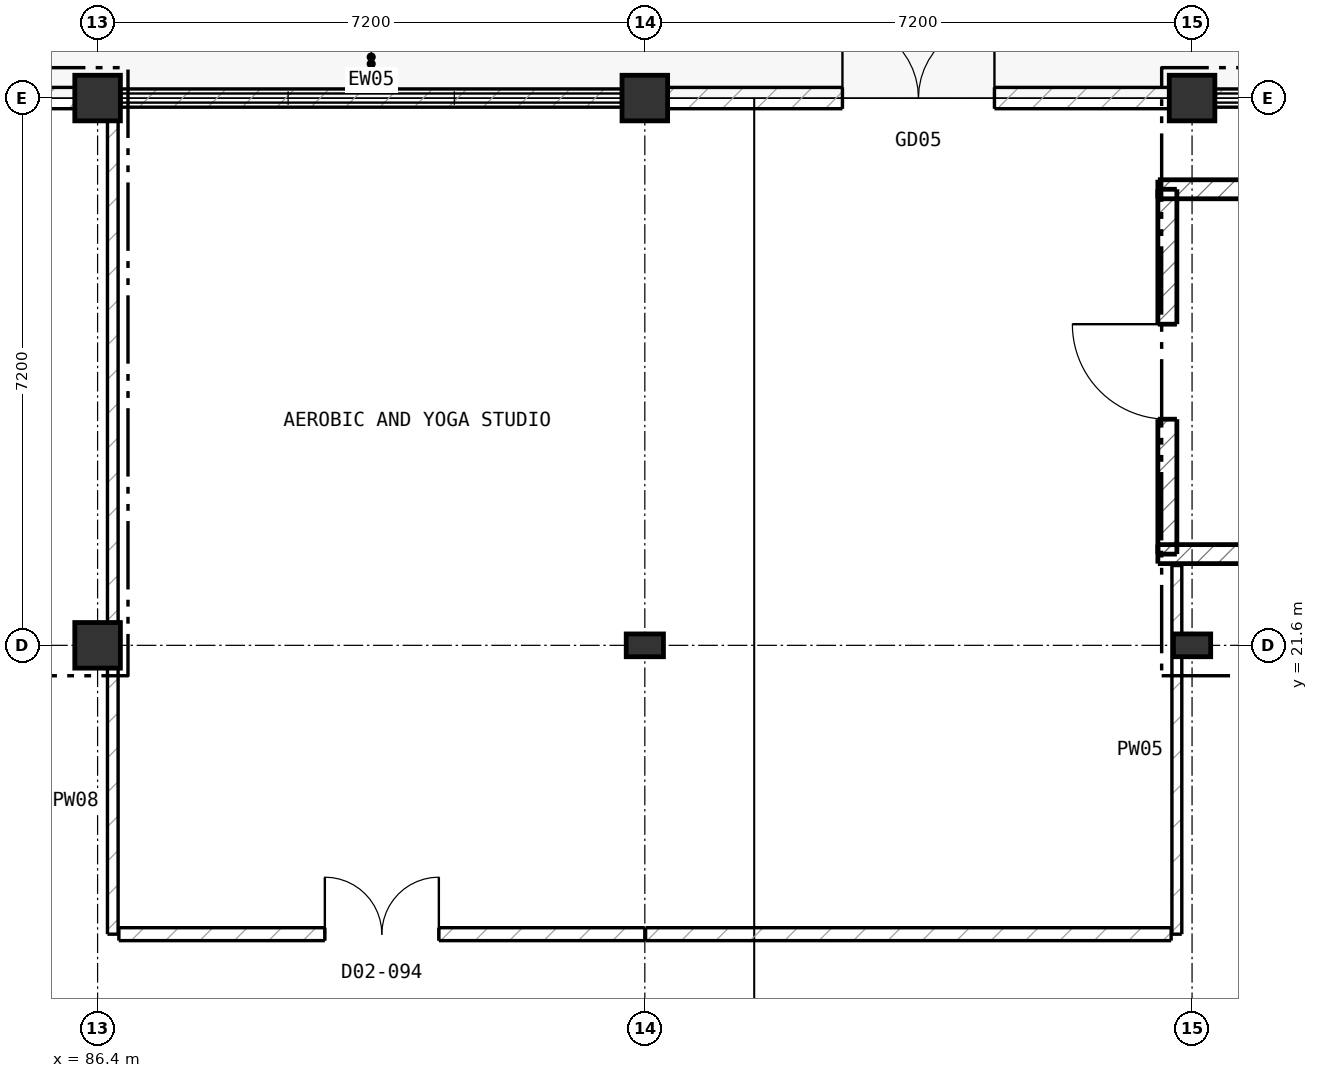
"""IFC4 building model, lengths in metres.
Left out: names, types, materials, properties, quantities, classifications, styles, units other than length and angle.
Written with IfcOpenShell. Run it as: python <this file> out.ifc"""

import sys

from ifc_helpers import new_model, si_unit, direction, frame, frame_2d, origin, origin_2d, place, context, subcontext, project, spatial, rectangle, i_section, extrude, element, fill, save


model = new_model("IFC4")
c1 = context("Model", 3, precision=1e-05, world=origin(), true_north=direction((0.0, 1.0)))
c2 = subcontext(c1, "Body", "Model", "MODEL_VIEW")
j1 = project(units=[si_unit("LENGTHUNIT", "METRE"), si_unit("PLANEANGLEUNIT", "RADIAN")], contexts=[c1])
p1 = place(None, origin())
s1 = spatial("IfcSite", under=j1, at=p1, CompositionType="ELEMENT")
p2 = place(p1, origin())
s2 = spatial("IfcBuilding", under=s1, at=p2, CompositionType="ELEMENT")
p3 = place(p2, frame((0.0, 0.0, 11.2)))
s3 = spatial("IfcBuildingStorey", under=s2, at=p3, CompositionType="ELEMENT", Elevation=11.2)
for number, where, z_axis, x_axis in (
    (1, (86.4, 21.6, 0.0), (0.0, 0.0, 1.0), (1.0, 0.0, 0.0)),
    (2, (86.4, 28.8, 0.0), (0.0, 0.0, 1.0), (1.0, 0.0, 0.0)),
):
    element("IfcColumn", number, at=place(p3, frame(where, z_axis=z_axis, x_axis=x_axis)), inside=s3, PredefinedType="COLUMN", context=c2, shape_type="SweptSolid", body=[
        extrude(rectangle(XDim=0.6, YDim=0.6, at=origin_2d()), origin(), (0.0, 0.0, 1.0), 4.8),
    ])
p4 = place(p3, frame((93.6, 21.6, 0.0), z_axis=(0.0, 0.0, 1.0), x_axis=(1.0, 0.0, 0.0)))
e3 = element("IfcColumn", 3, at=p4, inside=s3, PredefinedType="COLUMN", context=c2, shape_type="SweptSolid", body=[
    extrude(i_section(OverallWidth=0.3, OverallDepth=0.49, WebThickness=0.012, FlangeThickness=0.023, at=origin_2d()), origin(), (0.0, 0.0, 1.0), 4.8),
])
p5 = place(p3, frame((93.6, 28.8, 0.0), z_axis=(0.0, 0.0, 1.0), x_axis=(1.0, 0.0, 0.0)))
e4 = element("IfcColumn", 4, at=p5, inside=s3, PredefinedType="COLUMN", context=c2, shape_type="SweptSolid", body=[
    extrude(rectangle(XDim=0.6, YDim=0.6, at=origin_2d()), origin(), (0.0, 0.0, 1.0), 4.8),
])
p6 = place(p3, frame((100.8, 21.6, 0.0), z_axis=(0.0, 0.0, 1.0), x_axis=(1.0, 0.0, 0.0)))
e5 = element("IfcColumn", 5, at=p6, inside=s3, PredefinedType="COLUMN", context=c2, shape_type="SweptSolid", body=[
    extrude(i_section(OverallWidth=0.3, OverallDepth=0.49, WebThickness=0.012, FlangeThickness=0.023, at=origin_2d()), origin(), (0.0, 0.0, 1.0), 4.8),
])
p7 = place(p3, frame((100.8, 28.8, 0.0), z_axis=(0.0, 0.0, 1.0), x_axis=(1.0, 0.0, 0.0)))
e6 = element("IfcColumn", 6, at=p7, inside=s3, PredefinedType="COLUMN", context=c2, shape_type="SweptSolid", body=[
    extrude(rectangle(XDim=0.6, YDim=0.6, at=origin_2d()), origin(), (0.0, 0.0, 1.0), 4.8),
])
p8 = place(p3, frame((79.485, 28.8, 0.0), z_axis=(0.0, 0.0, 1.0), x_axis=(1.0, 0.0, 0.0)))
e7 = element("IfcWall", 7, at=p8, inside=s3, PredefinedType="SOLIDWALL", context=c2, shape_type="SweptSolid", body=[
    extrude(rectangle(XDim=6.63, YDim=0.28, at=frame_2d((3.315, 0.0))), origin(), (0.0, 0.0, 1.0), 4.185),
])
p9 = place(p8, frame((2.315, 0.0, 0.0)))
e8 = element("IfcOpeningElement", 8, at=p9, cuts=e7, PredefinedType="OPENING", context=c2, shape_type="SweptSolid", body=[
    extrude(rectangle(XDim=2.0, YDim=2.4, at=frame_2d((1.0, 1.2))), frame((0.0, 0.15, 0.0), z_axis=(0.0, -1.0, 0.0), x_axis=(1.0, 0.0, 0.0)), (0.0, 0.0, 1.0), 0.3),
])
p10 = place(p3, frame((86.685, 28.8, 0.0), z_axis=(0.0, 0.0, 1.0), x_axis=(1.0, 0.0, 0.0)))
e9 = element("IfcWall", 9, at=p10, inside=s3, PredefinedType="SOLIDWALL", context=c2, shape_type="SweptSolid", body=[
    extrude(rectangle(XDim=6.63, YDim=0.24, at=frame_2d((3.315, 0.0))), origin(), (0.0, 0.0, 1.0), 0.35),
])
p11 = place(p3, frame((93.885, 28.8, 0.0), z_axis=(0.0, 0.0, 1.0), x_axis=(1.0, 0.0, 0.0)))
e10 = element("IfcWall", 10, at=p11, inside=s3, PredefinedType="SOLIDWALL", context=c2, shape_type="SweptSolid", body=[
    extrude(rectangle(XDim=6.63, YDim=0.28, at=frame_2d((3.315, 0.0))), origin(), (0.0, 0.0, 1.0), 4.185),
])
p12 = place(p11, frame((2.315, 0.0, 0.0)))
e11 = element("IfcOpeningElement", 11, at=p12, cuts=e10, PredefinedType="OPENING", context=c2, shape_type="SweptSolid", body=[
    extrude(rectangle(XDim=2.0, YDim=2.4, at=frame_2d((1.0, 1.2))), frame((0.0, 0.15, 0.0), z_axis=(0.0, -1.0, 0.0), x_axis=(1.0, 0.0, 0.0)), (0.0, 0.0, 1.0), 0.3),
])
p13 = place(p3, frame((101.085, 28.8, 0.0), z_axis=(0.0, 0.0, 1.0), x_axis=(1.0, 0.0, 0.0)))
e12 = element("IfcWall", 12, at=p13, inside=s3, PredefinedType="SOLIDWALL", context=c2, shape_type="SweptSolid", body=[
    extrude(rectangle(XDim=6.911, YDim=0.24, at=frame_2d((3.456, 0.0))), origin(), (0.0, 0.0, 1.0), 0.35),
])
p14 = place(p3, frame((100.475, 22.8, 0.0), z_axis=(0.0, 0.0, 1.0), x_axis=(0.0, 1.0, 0.0)))
e13 = element("IfcWall", 13, at=p14, inside=s3, PredefinedType="SHEAR", context=c2, shape_type="SweptSolid", body=[
    extrude(rectangle(XDim=4.8, YDim=0.25, at=frame_2d((2.4, 0.0))), origin(), (0.0, 0.0, 1.0), 4.8),
])
p15 = place(p14, frame((1.775, 0.0, 0.0)))
e14 = element("IfcOpeningElement", 14, at=p15, cuts=e13, PredefinedType="OPENING", context=c2, shape_type="SweptSolid", body=[
    extrude(rectangle(XDim=1.25, YDim=2.2, at=frame_2d((0.625, 1.1))), frame((0.0, 0.135, 0.0), z_axis=(0.0, -1.0, 0.0), x_axis=(1.0, 0.0, 0.0)), (0.0, 0.0, 1.0), 0.27),
])
for number, where, z_axis, x_axis in (
    (15, (100.35, 27.6, 0.0), (0.0, 0.0, 1.0), (1.0, 0.0, 0.0)),
    (16, (108.0, 22.8, 0.0), (0.0, 0.0, 1.0), (-1.0, 0.0, 0.0)),
):
    element("IfcWall", number, at=place(p3, frame(where, z_axis=z_axis, x_axis=x_axis)), inside=s3, PredefinedType="SHEAR", context=c2, shape_type="SweptSolid", body=[
        extrude(rectangle(XDim=7.65, YDim=0.25, at=frame_2d((3.825, 0.0))), origin(), (0.0, 0.0, 1.0), 4.8),
    ])
p16 = place(p3, frame((86.6, 17.8, 0.0), z_axis=(0.0, 0.0, 1.0), x_axis=(0.0, 1.0, 0.0)))
e17 = element("IfcWall", 17, at=p16, inside=s3, PredefinedType="PARTITIONING", context=c2, shape_type="SweptSolid", body=[
    extrude(rectangle(XDim=3.5, YDim=0.14, at=frame_2d((1.75, 0.0))), origin(), (0.0, 0.0, 1.0), 4.51),
])
p17 = place(p3, frame((86.6, 21.9, 0.0), z_axis=(0.0, 0.0, 1.0), x_axis=(0.0, 1.0, 0.0)))
e18 = element("IfcWall", 18, at=p17, inside=s3, PredefinedType="PARTITIONING", context=c2, shape_type="SweptSolid", body=[
    extrude(rectangle(XDim=6.6, YDim=0.14, at=frame_2d((3.3, 0.0))), origin(), (0.0, 0.0, 1.0), 4.51),
])
p18 = place(p3, frame((100.6, 17.8, 0.0), z_axis=(0.0, 0.0, 1.0), x_axis=(0.0, 1.0, 0.0)))
e19 = element("IfcWall", 19, at=p18, inside=s3, PredefinedType="PARTITIONING", context=c2, shape_type="SweptSolid", body=[
    extrude(rectangle(XDim=4.85, YDim=0.13, at=frame_2d((2.425, 0.0))), origin(), (0.0, 0.0, 1.0), 4.49),
])
p19 = place(p3, frame((86.68, 17.8, 0.0), z_axis=(0.0, 0.0, 1.0), x_axis=(1.0, 0.0, 0.0)))
e20 = element("IfcWall", 20, at=p19, inside=s3, PredefinedType="PARTITIONING", context=c2, shape_type="SweptSolid", body=[
    extrude(rectangle(XDim=6.92, YDim=0.17, at=frame_2d((3.46, 0.0))), origin(), (0.0, 0.0, 1.0), 4.51),
])
p20 = place(p19, frame((2.71, 0.0, 0.0)))
e21 = element("IfcOpeningElement", 21, at=p20, cuts=e20, PredefinedType="OPENING", context=c2, shape_type="SweptSolid", body=[
    extrude(rectangle(XDim=1.5, YDim=2.2, at=frame_2d((0.75, 1.1))), frame((0.0, 0.095, 0.0), z_axis=(0.0, -1.0, 0.0), x_axis=(1.0, 0.0, 0.0)), (0.0, 0.0, 1.0), 0.19),
])
p21 = place(p3, frame((93.61, 17.8, 0.0), z_axis=(0.0, 0.0, 1.0), x_axis=(1.0, 0.0, 0.0)))
e22 = element("IfcWall", 22, at=p21, inside=s3, PredefinedType="PARTITIONING", context=c2, shape_type="SweptSolid", body=[
    extrude(rectangle(XDim=6.915, YDim=0.17, at=frame_2d((3.458, 0.0))), origin(), (0.0, 0.0, 1.0), 4.49),
])
p22 = place(p12, origin())
e23 = element("IfcDoor", 23, at=p22, inside=s3, OperationType="DOUBLE_DOOR_SINGLE_SWING", PredefinedType="DOOR", context=c2, shape_type="SweptSolid", body=[
    extrude(rectangle(XDim=2.0, YDim=2.4, at=frame_2d((1.0, 1.2))), frame((0.0, 0.025, 0.0), z_axis=(0.0, -1.0, 0.0), x_axis=(1.0, 0.0, 0.0)), (0.0, 0.0, 1.0), 0.05),
])
fill(e11, e23)
p23 = place(p15, origin())
e24 = element("IfcDoor", 24, at=p23, inside=s3, OperationType="SINGLE_SWING_RIGHT", PredefinedType="DOOR", context=c2, shape_type="SweptSolid", body=[
    extrude(rectangle(XDim=1.25, YDim=2.2, at=frame_2d((0.625, 1.1))), frame((0.0, 0.025, 0.0), z_axis=(0.0, -1.0, 0.0), x_axis=(1.0, 0.0, 0.0)), (0.0, 0.0, 1.0), 0.05),
])
fill(e14, e24)
p24 = place(p20, origin())
e25 = element("IfcDoor", 25, at=p24, inside=s3, OperationType="DOUBLE_DOOR_SINGLE_SWING", PredefinedType="DOOR", context=c2, shape_type="SweptSolid", body=[
    extrude(rectangle(XDim=1.5, YDim=2.2, at=frame_2d((0.75, 1.1))), frame((0.0, 0.025, 0.0), z_axis=(0.0, -1.0, 0.0), x_axis=(1.0, 0.0, 0.0)), (0.0, 0.0, 1.0), 0.05),
])
fill(e21, e25)
save(model, sys.argv[1])
